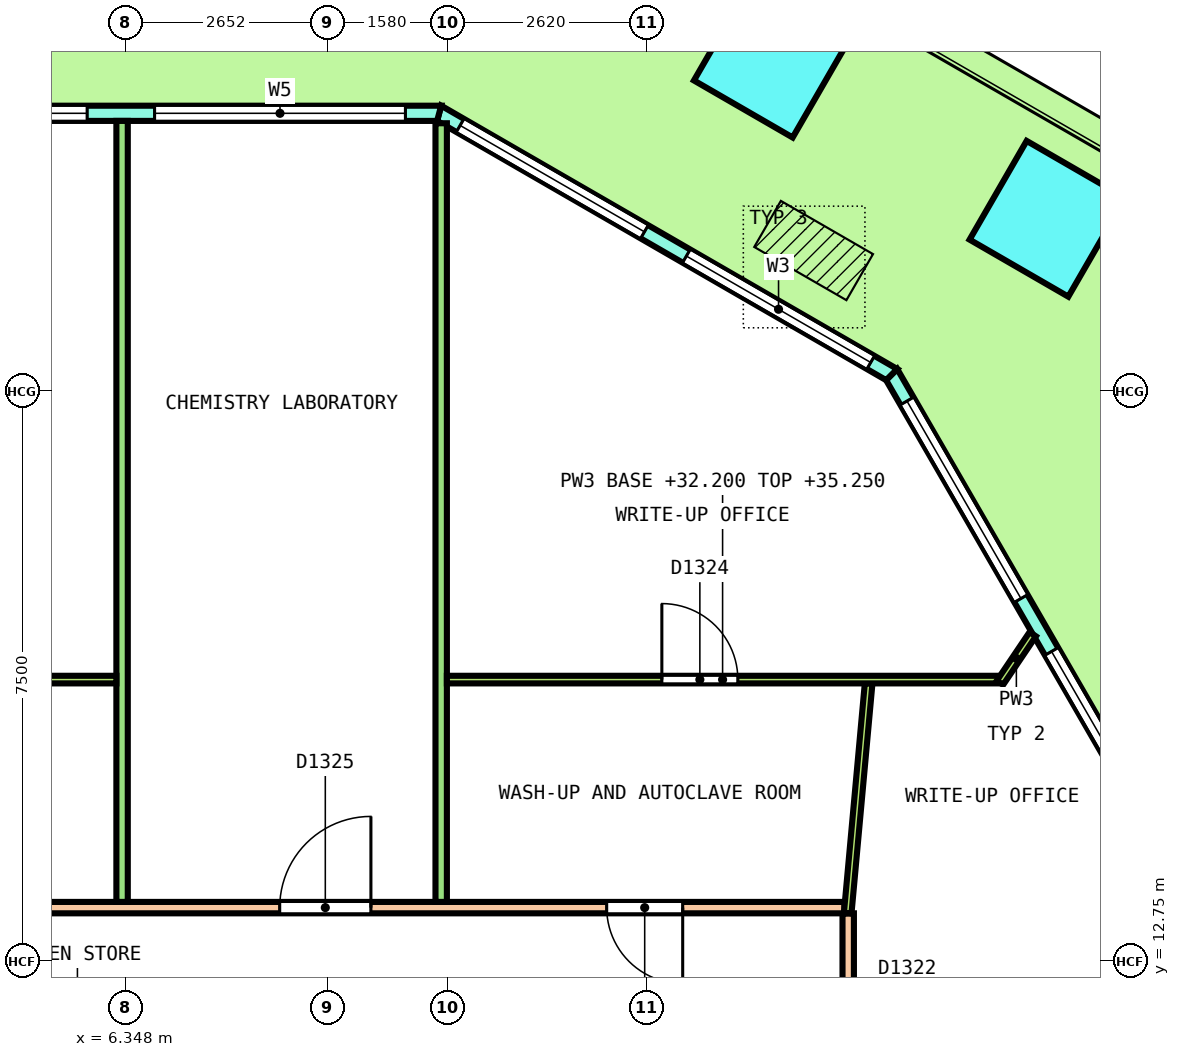
"""IFC4 building model, lengths in metres.
Left out: names, types, materials, properties, quantities, classifications, styles, units other than length and angle.
Written with IfcOpenShell. Run it as: python <this file> out.ifc"""

import sys

from ifc_helpers import new_model, si_unit, direction, frame, frame_2d, origin, origin_2d, place, context, subcontext, project, spatial, polyline, rectangle, outline, extrude, element, fill, save


model = new_model("IFC4")
c1 = context("Model", 3, precision=1e-05, world=origin(), true_north=direction((0.0, 1.0)))
c2 = subcontext(c1, "Body", "Model", "MODEL_VIEW")
j1 = project(units=[si_unit("LENGTHUNIT", "METRE"), si_unit("PLANEANGLEUNIT", "RADIAN")], contexts=[c1])
p1 = place(None, origin())
s1 = spatial("IfcSite", under=j1, at=p1, CompositionType="ELEMENT")
p2 = place(p1, origin())
s2 = spatial("IfcBuilding", under=s1, at=p2, CompositionType="ELEMENT")
p3 = place(p2, frame((0.0, 0.0, 32.2)))
s3 = spatial("IfcBuildingStorey", under=s2, at=p3, CompositionType="ELEMENT", Elevation=32.2)
for number, where, z_axis, x_axis in (
    (1, (18.472, 22.512, 0.0), (0.036, 0.0, 0.999), (-0.865, 0.5, 0.031)),
    (2, (14.845, 24.606, 0.0), (0.036, 0.0, 0.999), (-0.865, 0.5, 0.031)),
):
    element("IfcColumn", number, at=place(p3, frame(where, z_axis=z_axis, x_axis=x_axis)), inside=s3, PredefinedType="COLUMN", context=c2, shape_type="SweptSolid", body=[
        extrude(rectangle(XDim=1.5, YDim=1.5, at=origin_2d()), origin(), (0.0, 0.0, 1.0), 4.053),
    ])
p4 = place(p3, frame((25.932, 3.99, 0.0), z_axis=(0.0, 0.0, 1.0), x_axis=(-0.500001707189, 0.866024418136, 0.0)))
e3 = element("IfcWall", 3, at=p4, inside=s3, PredefinedType="SOLIDWALL", context=c2, shape_type="SweptSolid", body=[
    extrude(outline(polyline([(-0.027, -0.1), (0.977, -0.1), (1.981, -0.1), (2.985, -0.1), (3.989, -0.1), (4.993, -0.1), (5.997, -0.1), (7.0, -0.1), (8.004, -0.1), (9.008, -0.1), (10.012, -0.1), (11.016, -0.1), (12.02, -0.1), (13.024, -0.1), (14.028, -0.1), (15.032, -0.1), (16.036, -0.1), (17.04, -0.1), (18.043, -0.1), (19.047, -0.1), (18.994, 0.1), (17.995, 0.1), (16.997, 0.1), (15.999, 0.1), (15.001, 0.1), (14.002, 0.1), (13.004, 0.1), (12.006, 0.1), (11.008, 0.1), (10.009, 0.1), (9.011, 0.1), (8.013, 0.1), (7.015, 0.1), (6.016, 0.1), (5.018, 0.1), (4.02, 0.1), (3.022, 0.1), (2.023, 0.1), (1.025, 0.1), (0.027, 0.1), (-0.027, -0.1)])), origin(), (0.0, 0.0, 1.0), 4.1),
])
p5 = place(p4, frame((0.402, 0.0, 0.1)))
e4 = element("IfcOpeningElement", 4, at=p5, cuts=e3, PredefinedType="OPENING", context=c2, shape_type="SweptSolid", body=[
    extrude(rectangle(XDim=3.0, YDim=2.9, at=frame_2d((1.5, 1.45))), frame((0.0, 0.11, 0.0), z_axis=(0.0, -1.0, 0.0), x_axis=(1.0, 0.0, 0.0)), (0.0, 0.0, 1.0), 0.22),
])
p6 = place(p4, frame((4.206, 0.0, 0.1)))
e5 = element("IfcOpeningElement", 5, at=p6, cuts=e3, PredefinedType="OPENING", context=c2, shape_type="SweptSolid", body=[
    extrude(rectangle(XDim=3.0, YDim=2.9, at=frame_2d((1.5, 1.45))), frame((0.0, 0.11, 0.0), z_axis=(0.0, -1.0, 0.0), x_axis=(1.0, 0.0, 0.0)), (0.0, 0.0, 1.0), 0.22),
])
p7 = place(p4, frame((8.61, 0.0, 0.0)))
e6 = element("IfcOpeningElement", 6, at=p7, cuts=e3, PredefinedType="OPENING", context=c2, shape_type="SweptSolid", body=[
    extrude(rectangle(XDim=1.8, YDim=2.4, at=frame_2d((0.9, 1.2))), frame((0.0, 0.11, 0.0), z_axis=(0.0, -1.0, 0.0), x_axis=(1.0, 0.0, 0.0)), (0.0, 0.0, 1.0), 0.22),
])
p8 = place(p4, frame((8.61, 0.0, 2.55)))
e7 = element("IfcOpeningElement", 7, at=p8, cuts=e3, PredefinedType="OPENING", context=c2, shape_type="SweptSolid", body=[
    extrude(rectangle(XDim=1.8, YDim=0.45, at=frame_2d((0.9, 0.225))), frame((0.0, 0.11, 0.0), z_axis=(0.0, -1.0, 0.0), x_axis=(1.0, 0.0, 0.0)), (0.0, 0.0, 1.0), 0.22),
])
p9 = place(p4, frame((11.814, 0.0, 0.1)))
e8 = element("IfcOpeningElement", 8, at=p9, cuts=e3, PredefinedType="OPENING", context=c2, shape_type="SweptSolid", body=[
    extrude(rectangle(XDim=3.0, YDim=2.9, at=frame_2d((1.5, 1.45))), frame((0.0, 0.11, 0.0), z_axis=(0.0, -1.0, 0.0), x_axis=(1.0, 0.0, 0.0)), (0.0, 0.0, 1.0), 0.22),
])
p10 = place(p4, frame((15.618, 0.0, 0.1)))
e9 = element("IfcOpeningElement", 9, at=p10, cuts=e3, PredefinedType="OPENING", context=c2, shape_type="SweptSolid", body=[
    extrude(rectangle(XDim=3.0, YDim=2.9, at=frame_2d((1.5, 1.45))), frame((0.0, 0.11, 0.0), z_axis=(0.0, -1.0, 0.0), x_axis=(1.0, 0.0, 0.0)), (0.0, 0.0, 1.0), 0.22),
])
p11 = place(p3, frame((16.422, 20.463, 0.0), z_axis=(0.0, 0.0, 1.0), x_axis=(-0.866029458321, 0.49999297727, 0.0)))
e10 = element("IfcWall", 10, at=p11, inside=s3, PredefinedType="SOLIDWALL", context=c2, shape_type="SweptSolid", body=[
    extrude(outline(polyline([(-0.027, -0.1), (1.128, -0.1), (2.282, -0.1), (3.437, -0.1), (4.592, -0.1), (5.747, -0.1), (6.901, -0.1), (6.848, 0.1), (5.711, 0.1), (4.574, 0.1), (3.437, 0.1), (2.301, 0.1), (1.164, 0.1), (0.027, 0.1), (-0.027, -0.1)])), origin(), (0.0, 0.0, 1.0), 4.1),
])
p12 = place(p11, frame((0.319, 0.0, 0.1)))
e11 = element("IfcOpeningElement", 11, at=p12, cuts=e10, PredefinedType="OPENING", context=c2, shape_type="SweptSolid", body=[
    extrude(rectangle(XDim=2.8, YDim=2.9, at=frame_2d((1.4, 1.45))), frame((0.0, 0.11, 0.0), z_axis=(0.0, -1.0, 0.0), x_axis=(1.0, 0.0, 0.0)), (0.0, 0.0, 1.0), 0.22),
])
p13 = place(p11, frame((3.756, 0.0, 0.1)))
e12 = element("IfcOpeningElement", 12, at=p13, cuts=e10, PredefinedType="OPENING", context=c2, shape_type="SweptSolid", body=[
    extrude(rectangle(XDim=2.8, YDim=2.9, at=frame_2d((1.4, 1.45))), frame((0.0, 0.11, 0.0), z_axis=(0.0, -1.0, 0.0), x_axis=(1.0, 0.0, 0.0)), (0.0, 0.0, 1.0), 0.22),
])
p14 = place(p3, frame((10.468, 23.9, 0.0), z_axis=(0.0, 0.0, 1.0), x_axis=(-1.0, 0.0, 0.0)))
e13 = element("IfcWall", 13, at=p14, inside=s3, PredefinedType="SOLIDWALL", context=c2, shape_type="SweptSolid", body=[
    extrude(outline(polyline([(-0.027, -0.1), (1.023, -0.1), (2.072, -0.1), (3.122, -0.1), (4.171, -0.1), (5.221, -0.1), (6.27, -0.1), (7.32, -0.1), (8.369, -0.1), (9.419, -0.1), (10.468, -0.1), (11.518, -0.1), (12.567, -0.1), (13.617, -0.1), (14.666, -0.1), (15.716, -0.1), (16.765, -0.1), (17.815, -0.1), (18.864, -0.1), (19.914, -0.1), (20.963, -0.1), (20.91, 0.1), (19.865, 0.1), (18.821, 0.1), (17.777, 0.1), (16.733, 0.1), (15.689, 0.1), (14.645, 0.1), (13.601, 0.1), (12.557, 0.1), (11.512, 0.1), (10.468, 0.1), (9.424, 0.1), (8.38, 0.1), (7.336, 0.1), (6.292, 0.1), (5.248, 0.1), (4.203, 0.1), (3.159, 0.1), (2.115, 0.1), (1.071, 0.1), (0.027, 0.1), (-0.027, -0.1)])), origin(), (0.0, 0.0, 1.0), 4.1),
])
p15 = place(p14, frame((0.444, 0.0, 0.1)))
e14 = element("IfcOpeningElement", 14, at=p15, cuts=e13, PredefinedType="OPENING", context=c2, shape_type="SweptSolid", body=[
    extrude(rectangle(XDim=3.3, YDim=2.9, at=frame_2d((1.65, 1.45))), frame((0.0, 0.11, 0.0), z_axis=(0.0, -1.0, 0.0), x_axis=(1.0, 0.0, 0.0)), (0.0, 0.0, 1.0), 0.22),
])
p16 = place(p14, frame((4.631, 0.0, 0.1)))
e15 = element("IfcOpeningElement", 15, at=p16, cuts=e13, PredefinedType="OPENING", context=c2, shape_type="SweptSolid", body=[
    extrude(rectangle(XDim=3.3, YDim=2.9, at=frame_2d((1.65, 1.45))), frame((0.0, 0.11, 0.0), z_axis=(0.0, -1.0, 0.0), x_axis=(1.0, 0.0, 0.0)), (0.0, 0.0, 1.0), 0.22),
])
p17 = place(p14, frame((9.568, 0.0, 0.0)))
e16 = element("IfcOpeningElement", 16, at=p17, cuts=e13, PredefinedType="OPENING", context=c2, shape_type="SweptSolid", body=[
    extrude(rectangle(XDim=1.8, YDim=2.4, at=frame_2d((0.9, 1.2))), frame((0.0, 0.11, 0.0), z_axis=(0.0, -1.0, 0.0), x_axis=(1.0, 0.0, 0.0)), (0.0, 0.0, 1.0), 0.22),
])
p18 = place(p14, frame((9.568, 0.0, 2.55)))
e17 = element("IfcOpeningElement", 17, at=p18, cuts=e13, PredefinedType="OPENING", context=c2, shape_type="SweptSolid", body=[
    extrude(rectangle(XDim=1.8, YDim=0.45, at=frame_2d((0.9, 0.225))), frame((0.0, 0.11, 0.0), z_axis=(0.0, -1.0, 0.0), x_axis=(1.0, 0.0, 0.0)), (0.0, 0.0, 1.0), 0.22),
])
p19 = place(p14, frame((13.006, 0.0, 0.1)))
e18 = element("IfcOpeningElement", 18, at=p19, cuts=e13, PredefinedType="OPENING", context=c2, shape_type="SweptSolid", body=[
    extrude(rectangle(XDim=3.3, YDim=2.9, at=frame_2d((1.65, 1.45))), frame((0.0, 0.11, 0.0), z_axis=(0.0, -1.0, 0.0), x_axis=(1.0, 0.0, 0.0)), (0.0, 0.0, 1.0), 0.22),
])
p20 = place(p14, frame((17.193, 0.0, 0.1)))
e19 = element("IfcOpeningElement", 19, at=p20, cuts=e13, PredefinedType="OPENING", context=c2, shape_type="SweptSolid", body=[
    extrude(rectangle(XDim=3.3, YDim=2.9, at=frame_2d((1.65, 1.45))), frame((0.0, 0.11, 0.0), z_axis=(0.0, -1.0, 0.0), x_axis=(1.0, 0.0, 0.0)), (0.0, 0.0, 1.0), 0.22),
])
p21 = place(p3, frame((15.85, -13.375, 0.0), z_axis=(0.0, 0.0, 1.0), x_axis=(0.0, 1.0, 0.0)))
e20 = element("IfcWall", 20, at=p21, inside=s3, PredefinedType="PARTITIONING", context=c2, shape_type="SweptSolid", body=[
    extrude(rectangle(XDim=26.75, YDim=0.15, at=frame_2d((13.375, 0.0))), origin(), (0.0, 0.0, 1.0), 3.05),
])
p22 = place(p21, frame((14.212, 0.0, 0.0)))
e21 = element("IfcOpeningElement", 21, at=p22, cuts=e20, PredefinedType="OPENING", context=c2, shape_type="SweptSolid", body=[
    extrude(rectangle(XDim=1.0, YDim=2.1, at=frame_2d((0.5, 1.05))), frame((0.0, 0.085, 0.0), z_axis=(0.0, -1.0, 0.0), x_axis=(1.0, 0.0, 0.0)), (0.0, 0.0, 1.0), 0.17),
])
p23 = place(p21, frame((21.958, 0.0, 0.0)))
e22 = element("IfcOpeningElement", 22, at=p23, cuts=e20, PredefinedType="OPENING", context=c2, shape_type="SweptSolid", body=[
    extrude(rectangle(XDim=1.2, YDim=2.1, at=frame_2d((0.6, 1.05))), frame((0.0, 0.085, 0.0), z_axis=(0.0, -1.0, 0.0), x_axis=(1.0, 0.0, 0.0)), (0.0, 0.0, 1.0), 0.17),
])
p24 = place(p21, frame((24.743, 0.0, 0.0)))
e23 = element("IfcOpeningElement", 23, at=p24, cuts=e20, PredefinedType="OPENING", context=c2, shape_type="SweptSolid", body=[
    extrude(rectangle(XDim=1.0, YDim=2.1, at=frame_2d((0.5, 1.05))), frame((0.0, 0.085, 0.0), z_axis=(0.0, -1.0, 0.0), x_axis=(1.0, 0.0, 0.0)), (0.0, 0.0, 1.0), 0.17),
])
p25 = place(p21, frame((1.451, 0.0, 0.0)))
e24 = element("IfcOpeningElement", 24, at=p25, cuts=e20, PredefinedType="OPENING", context=c2, shape_type="SweptSolid", body=[
    extrude(rectangle(XDim=1.0, YDim=2.1, at=frame_2d((0.5, 1.05))), frame((0.0, 0.085, 0.0), z_axis=(0.0, -1.0, 0.0), x_axis=(1.0, 0.0, 0.0)), (0.0, 0.0, 1.0), 0.17),
])
p26 = place(p21, frame((4.671, 0.0, 0.0)))
e25 = element("IfcOpeningElement", 25, at=p26, cuts=e20, PredefinedType="OPENING", context=c2, shape_type="SweptSolid", body=[
    extrude(rectangle(XDim=1.2, YDim=2.1, at=frame_2d((0.6, 1.05))), frame((0.0, 0.085, 0.0), z_axis=(0.0, -1.0, 0.0), x_axis=(1.0, 0.0, 0.0)), (0.0, 0.0, 1.0), 0.17),
])
p27 = place(p3, frame((-15.775, 13.45, 0.0), z_axis=(0.0, 0.0, 1.0), x_axis=(1.0, 0.0, 0.0)))
e26 = element("IfcWall", 26, at=p27, inside=s3, PredefinedType="PARTITIONING", context=c2, shape_type="SweptSolid", body=[
    extrude(rectangle(XDim=31.575, YDim=0.15, at=frame_2d((15.788, 0.0))), origin(), (0.0, 0.0, 1.0), 3.05),
])
p28 = place(p27, frame((28.448, 0.0, 0.0)))
e27 = element("IfcOpeningElement", 27, at=p28, cuts=e26, PredefinedType="OPENING", context=c2, shape_type="SweptSolid", body=[
    extrude(rectangle(XDim=1.0, YDim=2.1, at=frame_2d((0.5, 1.05))), frame((0.0, 0.085, 0.0), z_axis=(0.0, -1.0, 0.0), x_axis=(1.0, 0.0, 0.0)), (0.0, 0.0, 1.0), 0.17),
])
p29 = place(p27, frame((24.146, 0.0, 0.0)))
e28 = element("IfcOpeningElement", 28, at=p29, cuts=e26, PredefinedType="OPENING", context=c2, shape_type="SweptSolid", body=[
    extrude(rectangle(XDim=1.2, YDim=2.1, at=frame_2d((0.6, 1.05))), frame((0.0, 0.085, 0.0), z_axis=(0.0, -1.0, 0.0), x_axis=(1.0, 0.0, 0.0)), (0.0, 0.0, 1.0), 0.17),
])
p30 = place(p27, frame((18.378, 0.0, 0.0)))
e29 = element("IfcOpeningElement", 29, at=p30, cuts=e26, PredefinedType="OPENING", context=c2, shape_type="SweptSolid", body=[
    extrude(rectangle(XDim=1.0, YDim=2.1, at=frame_2d((0.5, 1.05))), frame((0.0, 0.085, 0.0), z_axis=(0.0, -1.0, 0.0), x_axis=(1.0, 0.0, 0.0)), (0.0, 0.0, 1.0), 0.17),
])
p31 = place(p27, frame((3.288, 0.0, 0.0)))
e30 = element("IfcOpeningElement", 30, at=p31, cuts=e26, PredefinedType="OPENING", context=c2, shape_type="SweptSolid", body=[
    extrude(rectangle(XDim=1.0, YDim=2.1, at=frame_2d((0.5, 1.05))), frame((0.0, 0.085, 0.0), z_axis=(0.0, -1.0, 0.0), x_axis=(1.0, 0.0, 0.0)), (0.0, 0.0, 1.0), 0.17),
])
p32 = place(p3, frame((10.495, 13.525, 0.0), z_axis=(0.0, 0.0, 1.0), x_axis=(0.0, 1.0, 0.0)))
e31 = element("IfcWall", 31, at=p32, inside=s3, PredefinedType="PARTITIONING", context=c2, shape_type="SweptSolid", body=[
    extrude(rectangle(XDim=10.244, YDim=0.15, at=frame_2d((5.122, 0.0))), origin(), (0.0, 0.0, 1.0), 3.05),
])
p33 = place(p3, frame((6.297, 13.525, 0.0), z_axis=(0.0, 0.0, 1.0), x_axis=(0.0, 1.0, 0.0)))
e32 = element("IfcWall", 32, at=p33, inside=s3, PredefinedType="PARTITIONING", context=c2, shape_type="SweptSolid", body=[
    extrude(rectangle(XDim=10.275, YDim=0.15, at=frame_2d((5.138, 0.0))), origin(), (0.0, 0.0, 1.0), 3.05),
])
p34 = place(p3, frame((15.843, 13.375, 0.0), z_axis=(0.0, 0.0, 1.0), x_axis=(0.090666194534, 0.9958813389, 0.0)))
e33 = element("IfcWall", 33, at=p34, inside=s3, PredefinedType="PARTITIONING", context=c2, shape_type="SweptSolid", body=[
    extrude(rectangle(XDim=3.037, YDim=0.1, at=frame_2d((1.519, 0.0))), origin(), (0.0, 0.0, 1.0), 3.05),
])
p35 = place(p3, frame((-2.024, 16.45, 0.0), z_axis=(0.0, 0.0, 1.0), x_axis=(1.0, 0.0, 0.0)))
e34 = element("IfcWall", 34, at=p35, inside=s3, PredefinedType="PARTITIONING", context=c2, shape_type="SweptSolid", body=[
    extrude(rectangle(XDim=8.246, YDim=0.1, at=frame_2d((4.123, 0.0))), origin(), (0.0, 0.0, 1.0), 3.05),
])
p36 = place(p35, frame((5.297, 0.0, 0.0)))
e35 = element("IfcOpeningElement", 35, at=p36, cuts=e34, PredefinedType="OPENING", context=c2, shape_type="SweptSolid", body=[
    extrude(rectangle(XDim=1.0, YDim=2.1, at=frame_2d((0.5, 1.05))), frame((0.0, 0.06, 0.0), z_axis=(0.0, -1.0, 0.0), x_axis=(1.0, 0.0, 0.0)), (0.0, 0.0, 1.0), 0.12),
])
p37 = place(p3, frame((10.57, 16.45, 0.0), z_axis=(0.0, 0.0, 1.0), x_axis=(1.0, 0.0, 0.0)))
e36 = element("IfcWall", 36, at=p37, inside=s3, PredefinedType="PARTITIONING", context=c2, shape_type="SweptSolid", body=[
    extrude(rectangle(XDim=7.255, YDim=0.1, at=frame_2d((3.627, 0.0))), origin(), (0.0, 0.0, 1.0), 3.05),
])
p38 = place(p37, frame((2.828, 0.0, 0.0)))
e37 = element("IfcOpeningElement", 37, at=p38, cuts=e36, PredefinedType="OPENING", context=c2, shape_type="SweptSolid", body=[
    extrude(rectangle(XDim=1.0, YDim=2.1, at=frame_2d((0.5, 1.05))), frame((0.0, 0.06, 0.0), z_axis=(0.0, -1.0, 0.0), x_axis=(1.0, 0.0, 0.0)), (0.0, 0.0, 1.0), 0.12),
])
p39 = place(p3, frame((17.847, 16.409, 0.0), z_axis=(0.0, 0.0, 1.0), x_axis=(0.559587069363, 0.828771567925, 0.0)))
e38 = element("IfcWall", 38, at=p39, inside=s3, PredefinedType="PARTITIONING", context=c2, shape_type="SweptSolid", body=[
    extrude(rectangle(XDim=0.771, YDim=0.1, at=frame_2d((0.385, 0.0))), origin(), (0.0, 0.0, 1.0), 3.05),
])
p40 = place(p9, origin())
e39 = element("IfcWindow", 39, at=p40, inside=s3, PartitioningType="SINGLE_PANEL", PredefinedType="WINDOW", context=c2, shape_type="SweptSolid", body=[
    extrude(rectangle(XDim=3.0, YDim=2.9, at=frame_2d((1.5, 1.45))), frame((0.0, 0.03, 0.0), z_axis=(0.0, -1.0, 0.0), x_axis=(1.0, 0.0, 0.0)), (0.0, 0.0, 1.0), 0.06),
])
fill(e8, e39)
p41 = place(p10, origin())
e40 = element("IfcWindow", 40, at=p41, inside=s3, PartitioningType="SINGLE_PANEL", PredefinedType="WINDOW", context=c2, shape_type="SweptSolid", body=[
    extrude(rectangle(XDim=3.0, YDim=2.9, at=frame_2d((1.5, 1.45))), frame((0.0, 0.03, 0.0), z_axis=(0.0, -1.0, 0.0), x_axis=(1.0, 0.0, 0.0)), (0.0, 0.0, 1.0), 0.06),
])
fill(e9, e40)
p42 = place(p12, origin())
e41 = element("IfcWindow", 41, at=p42, inside=s3, PartitioningType="SINGLE_PANEL", PredefinedType="WINDOW", context=c2, shape_type="SweptSolid", body=[
    extrude(rectangle(XDim=2.8, YDim=2.9, at=frame_2d((1.4, 1.45))), frame((0.0, 0.03, 0.0), z_axis=(0.0, -1.0, 0.0), x_axis=(1.0, 0.0, 0.0)), (0.0, 0.0, 1.0), 0.06),
])
fill(e11, e41)
p43 = place(p13, origin())
e42 = element("IfcWindow", 42, at=p43, inside=s3, PartitioningType="SINGLE_PANEL", PredefinedType="WINDOW", context=c2, shape_type="SweptSolid", body=[
    extrude(rectangle(XDim=2.8, YDim=2.9, at=frame_2d((1.4, 1.45))), frame((0.0, 0.03, 0.0), z_axis=(0.0, -1.0, 0.0), x_axis=(1.0, 0.0, 0.0)), (0.0, 0.0, 1.0), 0.06),
])
fill(e12, e42)
p44 = place(p15, origin())
e43 = element("IfcWindow", 43, at=p44, inside=s3, PartitioningType="SINGLE_PANEL", PredefinedType="WINDOW", context=c2, shape_type="SweptSolid", body=[
    extrude(rectangle(XDim=3.3, YDim=2.9, at=frame_2d((1.65, 1.45))), frame((0.0, 0.03, 0.0), z_axis=(0.0, -1.0, 0.0), x_axis=(1.0, 0.0, 0.0)), (0.0, 0.0, 1.0), 0.06),
])
fill(e14, e43)
p45 = place(p16, origin())
e44 = element("IfcWindow", 44, at=p45, inside=s3, PartitioningType="SINGLE_PANEL", PredefinedType="WINDOW", context=c2, shape_type="SweptSolid", body=[
    extrude(rectangle(XDim=3.3, YDim=2.9, at=frame_2d((1.65, 1.45))), frame((0.0, 0.03, 0.0), z_axis=(0.0, -1.0, 0.0), x_axis=(1.0, 0.0, 0.0)), (0.0, 0.0, 1.0), 0.06),
])
fill(e15, e44)
p46 = place(p28, origin())
e45 = element("IfcDoor", 45, at=p46, inside=s3, OperationType="SINGLE_SWING_RIGHT", PredefinedType="DOOR", context=c2, shape_type="SweptSolid", body=[
    extrude(rectangle(XDim=1.0, YDim=2.1, at=frame_2d((0.5, 1.05))), frame((0.0, 0.025, 0.0), z_axis=(0.0, -1.0, 0.0), x_axis=(1.0, 0.0, 0.0)), (0.0, 0.0, 1.0), 0.05),
])
fill(e27, e45)
p47 = place(p38, origin())
e46 = element("IfcDoor", 46, at=p47, inside=s3, OperationType="SINGLE_SWING_RIGHT", PredefinedType="DOOR", context=c2, shape_type="SweptSolid", body=[
    extrude(rectangle(XDim=1.0, YDim=2.1, at=frame_2d((0.5, 1.05))), frame((0.0, 0.025, 0.0), z_axis=(0.0, -1.0, 0.0), x_axis=(1.0, 0.0, 0.0)), (0.0, 0.0, 1.0), 0.05),
])
fill(e37, e46)
p48 = place(p29, origin())
e47 = element("IfcDoor", 47, at=p48, inside=s3, OperationType="DOUBLE_DOOR_SINGLE_SWING", PredefinedType="DOOR", context=c2, shape_type="SweptSolid", body=[
    extrude(rectangle(XDim=1.2, YDim=2.1, at=frame_2d((0.6, 1.05))), frame((0.0, 0.025, 0.0), z_axis=(0.0, -1.0, 0.0), x_axis=(1.0, 0.0, 0.0)), (0.0, 0.0, 1.0), 0.05),
])
fill(e28, e47)
save(model, sys.argv[1])
